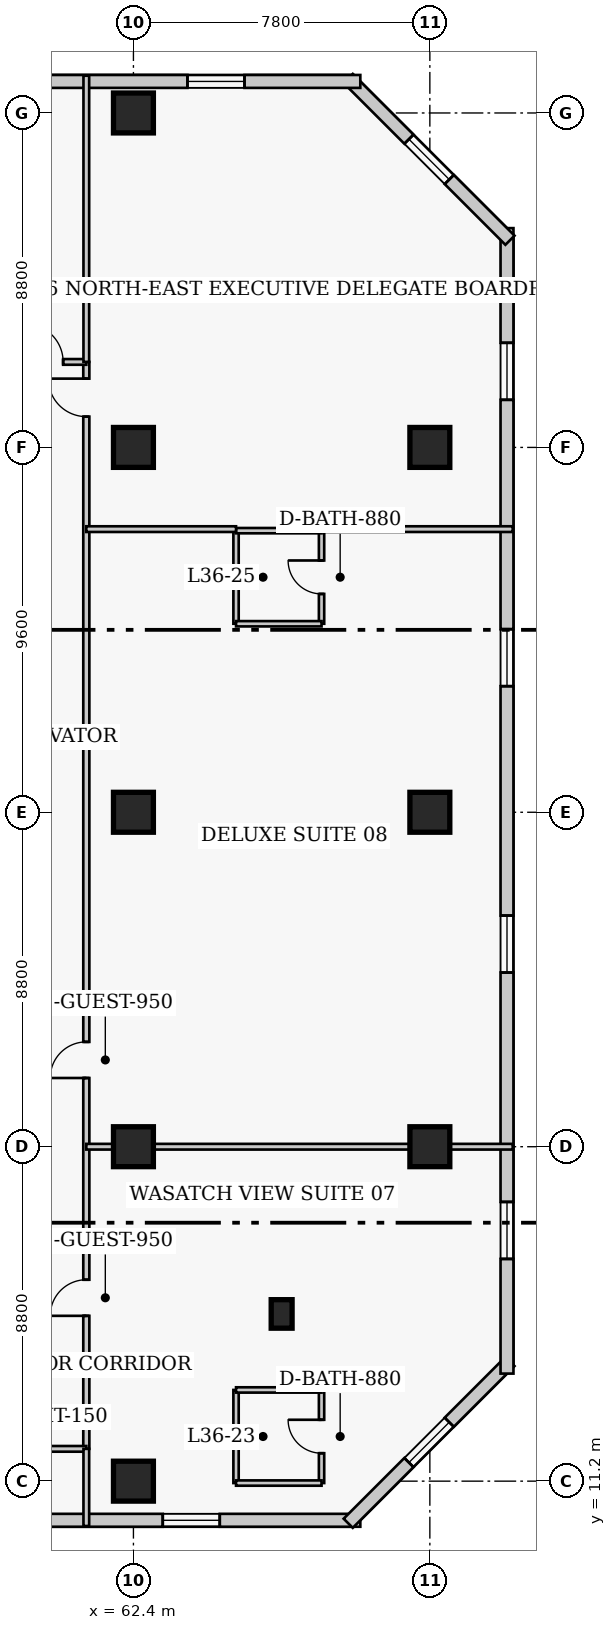
"""IFC4 building model, lengths in metres.
Left out: names, types, materials, properties, quantities, classifications, styles, units other than length and angle.
Written with IfcOpenShell. Run it as: python <this file> out.ifc"""

import sys

from ifc_helpers import new_model, si_unit, direction, frame, frame_2d, origin, origin_2d, place, context, subcontext, project, spatial, rectangle, extrude, element, fill, save


model = new_model("IFC4")
c1 = context("Model", 3, precision=1e-05, world=origin(), true_north=direction((0.0, 1.0)))
c2 = subcontext(c1, "Body", "Model", "MODEL_VIEW")
j1 = project(units=[si_unit("LENGTHUNIT", "METRE"), si_unit("PLANEANGLEUNIT", "RADIAN")], contexts=[c1])
p1 = place(None, origin())
s1 = spatial("IfcSite", under=j1, at=p1, CompositionType="ELEMENT")
p2 = place(p1, origin())
s2 = spatial("IfcBuilding", under=s1, at=p2, CompositionType="ELEMENT")
p3 = place(p2, frame((0.0, 0.0, 146.0)))
s3 = spatial("IfcBuildingStorey", under=s2, at=p3, CompositionType="ELEMENT", Elevation=146.0)
for number, where, z_axis, x_axis in (
    (1, (62.4, 11.2, 0.0), (0.0, 0.0, 1.0), (1.0, 0.0, 0.0)),
    (2, (62.4, 20.0, 0.0), (0.0, 0.0, 1.0), (1.0, 0.0, 0.0)),
    (3, (62.4, 28.8, 0.0), (0.0, 0.0, 1.0), (1.0, 0.0, 0.0)),
    (4, (62.4, 38.4, 0.0), (0.0, 0.0, 1.0), (1.0, 0.0, 0.0)),
    (5, (62.4, 47.2, 0.0), (0.0, 0.0, 1.0), (1.0, 0.0, 0.0)),
    (6, (70.2, 20.0, 0.0), (0.0, 0.0, 1.0), (1.0, 0.0, 0.0)),
    (7, (70.2, 28.8, 0.0), (0.0, 0.0, 1.0), (1.0, 0.0, 0.0)),
    (8, (70.2, 38.4, 0.0), (0.0, 0.0, 1.0), (1.0, 0.0, 0.0)),
):
    element("IfcColumn", number, at=place(p3, frame(where, z_axis=z_axis, x_axis=x_axis)), inside=s3, PredefinedType="COLUMN", context=c2, shape_type="SweptSolid", body=[
        extrude(rectangle(XDim=1.05, YDim=1.05, at=origin_2d()), origin(), (0.0, 0.0, 1.0), 3.8),
    ])
p4 = place(p3, frame((66.3, 15.6, 0.0), z_axis=(0.0, 0.0, 1.0), x_axis=(1.0, 0.0, 0.0)))
e9 = element("IfcColumn", 9, at=p4, inside=s3, PredefinedType="PILASTER", context=c2, shape_type="SweptSolid", body=[
    extrude(rectangle(XDim=0.55, YDim=0.75, at=origin_2d()), origin(), (0.0, 0.0, 1.0), 3.8),
])
p5 = place(p3, frame((41.68, 10.17, 0.0), z_axis=(0.0, 0.0, 1.0), x_axis=(1.0, 0.0, 0.0)))
e10 = element("IfcWall", 10, at=p5, inside=s3, PredefinedType="SOLIDWALL", context=c2, shape_type="SweptSolid", body=[
    extrude(rectangle(XDim=26.69, YDim=0.34, at=frame_2d((13.345, 0.0))), origin(), (0.0, 0.0, 1.0), 3.55),
])
p6 = place(p5, frame((2.548, 0.0, 0.85)))
e11 = element("IfcOpeningElement", 11, at=p6, cuts=e10, PredefinedType="OPENING", context=c2, shape_type="SweptSolid", body=[
    extrude(rectangle(XDim=1.5, YDim=1.75, at=frame_2d((0.75, 0.875))), frame((0.0, 0.18, 0.0), z_axis=(0.0, -1.0, 0.0), x_axis=(1.0, 0.0, 0.0)), (0.0, 0.0, 1.0), 0.36),
])
p7 = place(p5, frame((13.745, 0.0, 0.85)))
e12 = element("IfcOpeningElement", 12, at=p7, cuts=e10, PredefinedType="OPENING", context=c2, shape_type="SweptSolid", body=[
    extrude(rectangle(XDim=1.5, YDim=1.75, at=frame_2d((0.75, 0.875))), frame((0.0, 0.18, 0.0), z_axis=(0.0, -1.0, 0.0), x_axis=(1.0, 0.0, 0.0)), (0.0, 0.0, 1.0), 0.36),
])
p8 = place(p5, frame((21.492, 0.0, 0.85)))
e13 = element("IfcOpeningElement", 13, at=p8, cuts=e10, PredefinedType="OPENING", context=c2, shape_type="SweptSolid", body=[
    extrude(rectangle(XDim=1.5, YDim=1.75, at=frame_2d((0.75, 0.875))), frame((0.0, 0.18, 0.0), z_axis=(0.0, -1.0, 0.0), x_axis=(1.0, 0.0, 0.0)), (0.0, 0.0, 1.0), 0.36),
])
p9 = place(p3, frame((68.052, 10.092, 0.0), z_axis=(0.0, 0.0, 1.0), x_axis=(0.707106781187, 0.707106781187, 0.0)))
e14 = element("IfcWall", 14, at=p9, inside=s3, PredefinedType="SOLIDWALL", context=c2, shape_type="SweptSolid", body=[
    extrude(rectangle(XDim=6.02, YDim=0.34, at=frame_2d((3.01, 0.0))), origin(), (0.0, 0.0, 1.0), 3.55),
])
p10 = place(p9, frame((2.26, 0.0, 0.85)))
e15 = element("IfcOpeningElement", 15, at=p10, cuts=e14, PredefinedType="OPENING", context=c2, shape_type="SweptSolid", body=[
    extrude(rectangle(XDim=1.5, YDim=1.75, at=frame_2d((0.75, 0.875))), frame((0.0, 0.18, 0.0), z_axis=(0.0, -1.0, 0.0), x_axis=(1.0, 0.0, 0.0)), (0.0, 0.0, 1.0), 0.36),
])
p11 = place(p3, frame((72.23, 14.03, 0.0), z_axis=(0.0, 0.0, 1.0), x_axis=(0.0, 1.0, 0.0)))
e16 = element("IfcWall", 16, at=p11, inside=s3, PredefinedType="SOLIDWALL", context=c2, shape_type="SweptSolid", body=[
    extrude(rectangle(XDim=30.14, YDim=0.34, at=frame_2d((15.07, 0.0))), origin(), (0.0, 0.0, 1.0), 3.55),
])
p12 = place(p11, frame((3.018, 0.0, 0.85)))
e17 = element("IfcOpeningElement", 17, at=p12, cuts=e16, PredefinedType="OPENING", context=c2, shape_type="SweptSolid", body=[
    extrude(rectangle(XDim=1.5, YDim=1.75, at=frame_2d((0.75, 0.875))), frame((0.0, 0.18, 0.0), z_axis=(0.0, -1.0, 0.0), x_axis=(1.0, 0.0, 0.0)), (0.0, 0.0, 1.0), 0.36),
])
p13 = place(p11, frame((10.552, 0.0, 0.85)))
e18 = element("IfcOpeningElement", 18, at=p13, cuts=e16, PredefinedType="OPENING", context=c2, shape_type="SweptSolid", body=[
    extrude(rectangle(XDim=1.5, YDim=1.75, at=frame_2d((0.75, 0.875))), frame((0.0, 0.18, 0.0), z_axis=(0.0, -1.0, 0.0), x_axis=(1.0, 0.0, 0.0)), (0.0, 0.0, 1.0), 0.36),
])
p14 = place(p11, frame((18.087, 0.0, 0.85)))
e19 = element("IfcOpeningElement", 19, at=p14, cuts=e16, PredefinedType="OPENING", context=c2, shape_type="SweptSolid", body=[
    extrude(rectangle(XDim=1.5, YDim=1.75, at=frame_2d((0.75, 0.875))), frame((0.0, 0.18, 0.0), z_axis=(0.0, -1.0, 0.0), x_axis=(1.0, 0.0, 0.0)), (0.0, 0.0, 1.0), 0.36),
])
p15 = place(p11, frame((25.623, 0.0, 0.85)))
e20 = element("IfcOpeningElement", 20, at=p15, cuts=e16, PredefinedType="OPENING", context=c2, shape_type="SweptSolid", body=[
    extrude(rectangle(XDim=1.5, YDim=1.75, at=frame_2d((0.75, 0.875))), frame((0.0, 0.18, 0.0), z_axis=(0.0, -1.0, 0.0), x_axis=(1.0, 0.0, 0.0)), (0.0, 0.0, 1.0), 0.36),
])
p16 = place(p3, frame((72.308, 43.852, 0.0), z_axis=(0.0, 0.0, 1.0), x_axis=(-0.707106781187, 0.707106781187, 0.0)))
e21 = element("IfcWall", 21, at=p16, inside=s3, PredefinedType="SOLIDWALL", context=c2, shape_type="SweptSolid", body=[
    extrude(rectangle(XDim=6.02, YDim=0.34, at=frame_2d((3.01, 0.0))), origin(), (0.0, 0.0, 1.0), 3.55),
])
p17 = place(p16, frame((2.26, 0.0, 0.85)))
e22 = element("IfcOpeningElement", 22, at=p17, cuts=e21, PredefinedType="OPENING", context=c2, shape_type="SweptSolid", body=[
    extrude(rectangle(XDim=1.5, YDim=1.75, at=frame_2d((0.75, 0.875))), frame((0.0, 0.18, 0.0), z_axis=(0.0, -1.0, 0.0), x_axis=(1.0, 0.0, 0.0)), (0.0, 0.0, 1.0), 0.36),
])
p18 = place(p3, frame((68.37, 48.03, 0.0), z_axis=(0.0, 0.0, 1.0), x_axis=(-1.0, 0.0, 0.0)))
e23 = element("IfcWall", 23, at=p18, inside=s3, PredefinedType="SOLIDWALL", context=c2, shape_type="SweptSolid", body=[
    extrude(rectangle(XDim=26.69, YDim=0.34, at=frame_2d((13.345, 0.0))), origin(), (0.0, 0.0, 1.0), 3.55),
])
p19 = place(p18, frame((3.048, 0.0, 0.85)))
e24 = element("IfcOpeningElement", 24, at=p19, cuts=e23, PredefinedType="OPENING", context=c2, shape_type="SweptSolid", body=[
    extrude(rectangle(XDim=1.5, YDim=1.75, at=frame_2d((0.75, 0.875))), frame((0.0, 0.18, 0.0), z_axis=(0.0, -1.0, 0.0), x_axis=(1.0, 0.0, 0.0)), (0.0, 0.0, 1.0), 0.36),
])
p20 = place(p18, frame((11.445, 0.0, 0.85)))
e25 = element("IfcOpeningElement", 25, at=p20, cuts=e23, PredefinedType="OPENING", context=c2, shape_type="SweptSolid", body=[
    extrude(rectangle(XDim=1.5, YDim=1.75, at=frame_2d((0.75, 0.875))), frame((0.0, 0.18, 0.0), z_axis=(0.0, -1.0, 0.0), x_axis=(1.0, 0.0, 0.0)), (0.0, 0.0, 1.0), 0.36),
])
p21 = place(p18, frame((22.642, 0.0, 0.85)))
e26 = element("IfcOpeningElement", 26, at=p21, cuts=e23, PredefinedType="OPENING", context=c2, shape_type="SweptSolid", body=[
    extrude(rectangle(XDim=1.5, YDim=1.75, at=frame_2d((0.75, 0.875))), frame((0.0, 0.18, 0.0), z_axis=(0.0, -1.0, 0.0), x_axis=(1.0, 0.0, 0.0)), (0.0, 0.0, 1.0), 0.36),
])
p22 = place(p3, frame((61.16, 12.05, 0.0), z_axis=(0.0, 0.0, 1.0), x_axis=(0.0, 1.0, 0.0)))
e27 = element("IfcWall", 27, at=p22, inside=s3, PredefinedType="PARTITIONING", context=c2, shape_type="SweptSolid", body=[
    extrude(rectangle(XDim=28.6, YDim=0.16, at=frame_2d((14.3, 0.0))), origin(), (0.0, 0.0, 1.0), 3.55),
])
p23 = place(p22, frame((3.5, 0.0, 0.0)))
e28 = element("IfcOpeningElement", 28, at=p23, cuts=e27, PredefinedType="OPENING", context=c2, shape_type="SweptSolid", body=[
    extrude(rectangle(XDim=0.95, YDim=2.1, at=frame_2d((0.475, 1.05))), frame((0.0, 0.09, 0.0), z_axis=(0.0, -1.0, 0.0), x_axis=(1.0, 0.0, 0.0)), (0.0, 0.0, 1.0), 0.18),
])
p24 = place(p22, frame((9.758, 0.0, 0.0)))
e29 = element("IfcOpeningElement", 29, at=p24, cuts=e27, PredefinedType="OPENING", context=c2, shape_type="SweptSolid", body=[
    extrude(rectangle(XDim=0.95, YDim=2.1, at=frame_2d((0.475, 1.05))), frame((0.0, 0.09, 0.0), z_axis=(0.0, -1.0, 0.0), x_axis=(1.0, 0.0, 0.0)), (0.0, 0.0, 1.0), 0.18),
])
p25 = place(p22, frame((27.16, 0.0, 0.0)))
e30 = element("IfcOpeningElement", 30, at=p25, cuts=e27, PredefinedType="OPENING", context=c2, shape_type="SweptSolid", body=[
    extrude(rectangle(XDim=1.0, YDim=2.15, at=frame_2d((0.5, 1.075))), frame((0.0, 0.09, 0.0), z_axis=(0.0, -1.0, 0.0), x_axis=(1.0, 0.0, 0.0)), (0.0, 0.0, 1.0), 0.18),
])
p26 = place(p3, frame((58.94, 12.05, 0.0), z_axis=(0.0, 0.0, 1.0), x_axis=(1.0, 0.0, 0.0)))
e31 = element("IfcWall", 31, at=p26, inside=s3, PredefinedType="PARTITIONING", context=c2, shape_type="SweptSolid", body=[
    extrude(rectangle(XDim=2.22, YDim=0.15, at=frame_2d((1.11, 0.0))), origin(), (0.0, 0.0, 1.0), 3.55),
])
p27 = place(p3, frame((56.8, 40.65, 0.0), z_axis=(0.0, 0.0, 1.0), x_axis=(1.0, 0.0, 0.0)))
e32 = element("IfcWall", 32, at=p27, inside=s3, PredefinedType="PARTITIONING", context=c2, shape_type="SweptSolid", body=[
    extrude(rectangle(XDim=4.36, YDim=0.15, at=frame_2d((2.18, 0.0))), origin(), (0.0, 0.0, 1.0), 3.55),
])
p28 = place(p27, frame((2.75, 0.0, 0.0)))
e33 = element("IfcOpeningElement", 33, at=p28, cuts=e32, PredefinedType="OPENING", context=c2, shape_type="SweptSolid", body=[
    extrude(rectangle(XDim=1.0, YDim=2.15, at=frame_2d((0.5, 1.075))), frame((0.0, 0.085, 0.0), z_axis=(0.0, -1.0, 0.0), x_axis=(1.0, 0.0, 0.0)), (0.0, 0.0, 1.0), 0.17),
])
p29 = place(p3, frame((61.16, 40.65, 0.0), z_axis=(0.0, 0.0, 1.0), x_axis=(0.0, 1.0, 0.0)))
e34 = element("IfcWall", 34, at=p29, inside=s3, PredefinedType="PARTITIONING", context=c2, shape_type="SweptSolid", body=[
    extrude(rectangle(XDim=7.53, YDim=0.15, at=frame_2d((3.765, 0.0))), origin(), (0.0, 0.0, 1.0), 3.55),
])
p30 = place(p3, frame((61.16, 10.02, 0.0), z_axis=(0.0, 0.0, 1.0), x_axis=(0.0, 1.0, 0.0)))
e35 = element("IfcWall", 35, at=p30, inside=s3, PredefinedType="PARTITIONING", context=c2, shape_type="SweptSolid", body=[
    extrude(rectangle(XDim=2.03, YDim=0.15, at=frame_2d((1.015, 0.0))), origin(), (0.0, 0.0, 1.0), 3.55),
])
p31 = place(p3, frame((65.1, 11.15, 0.0), z_axis=(0.0, 0.0, 1.0), x_axis=(0.0, 1.0, 0.0)))
e36 = element("IfcWall", 36, at=p31, inside=s3, PredefinedType="PLUMBINGWALL", context=c2, shape_type="SweptSolid", body=[
    extrude(rectangle(XDim=2.45, YDim=0.14, at=frame_2d((1.225, 0.0))), origin(), (0.0, 0.0, 1.0), 3.55),
])
p32 = place(p3, frame((67.35, 11.15, 0.0), z_axis=(0.0, 0.0, 1.0), x_axis=(0.0, 1.0, 0.0)))
e37 = element("IfcWall", 37, at=p32, inside=s3, PredefinedType="PLUMBINGWALL", context=c2, shape_type="SweptSolid", body=[
    extrude(rectangle(XDim=2.45, YDim=0.14, at=frame_2d((1.225, 0.0))), origin(), (0.0, 0.0, 1.0), 3.55),
])
p33 = place(p32, frame((0.785, 0.0, 0.0)))
e38 = element("IfcOpeningElement", 38, at=p33, cuts=e37, PredefinedType="OPENING", context=c2, shape_type="SweptSolid", body=[
    extrude(rectangle(XDim=0.88, YDim=2.05, at=frame_2d((0.44, 1.025))), frame((0.0, 0.08, 0.0), z_axis=(0.0, -1.0, 0.0), x_axis=(1.0, 0.0, 0.0)), (0.0, 0.0, 1.0), 0.16),
])
for number, where, z_axis, x_axis in (
    (39, (65.1, 11.15, 0.0), (0.0, 0.0, 1.0), (1.0, 0.0, 0.0)),
    (40, (65.1, 13.6, 0.0), (0.0, 0.0, 1.0), (1.0, 0.0, 0.0)),
):
    element("IfcWall", number, at=place(p3, frame(where, z_axis=z_axis, x_axis=x_axis)), inside=s3, PredefinedType="PLUMBINGWALL", context=c2, shape_type="SweptSolid", body=[
        extrude(rectangle(XDim=2.25, YDim=0.14, at=frame_2d((1.125, 0.0))), origin(), (0.0, 0.0, 1.0), 3.55),
    ])
p34 = place(p3, frame((61.16, 20.0, 0.0), z_axis=(0.0, 0.0, 1.0), x_axis=(1.0, 0.0, 0.0)))
e41 = element("IfcWall", 41, at=p34, inside=s3, PredefinedType="PARTITIONING", context=c2, shape_type="SweptSolid", body=[
    extrude(rectangle(XDim=11.22, YDim=0.15, at=frame_2d((5.61, 0.0))), origin(), (0.0, 0.0, 1.0), 2.778),
])
p35 = place(p3, frame((65.1, 33.76, 0.0), z_axis=(0.0, 0.0, 1.0), x_axis=(0.0, 1.0, 0.0)))
e42 = element("IfcWall", 42, at=p35, inside=s3, PredefinedType="PLUMBINGWALL", context=c2, shape_type="SweptSolid", body=[
    extrude(rectangle(XDim=2.45, YDim=0.14, at=frame_2d((1.225, 0.0))), origin(), (0.0, 0.0, 1.0), 3.55),
])
p36 = place(p3, frame((67.35, 33.76, 0.0), z_axis=(0.0, 0.0, 1.0), x_axis=(0.0, 1.0, 0.0)))
e43 = element("IfcWall", 43, at=p36, inside=s3, PredefinedType="PLUMBINGWALL", context=c2, shape_type="SweptSolid", body=[
    extrude(rectangle(XDim=2.45, YDim=0.14, at=frame_2d((1.225, 0.0))), origin(), (0.0, 0.0, 1.0), 3.55),
])
p37 = place(p36, frame((0.785, 0.0, 0.0)))
e44 = element("IfcOpeningElement", 44, at=p37, cuts=e43, PredefinedType="OPENING", context=c2, shape_type="SweptSolid", body=[
    extrude(rectangle(XDim=0.88, YDim=2.05, at=frame_2d((0.44, 1.025))), frame((0.0, 0.08, 0.0), z_axis=(0.0, -1.0, 0.0), x_axis=(1.0, 0.0, 0.0)), (0.0, 0.0, 1.0), 0.16),
])
for number, where, z_axis, x_axis in (
    (45, (65.1, 33.76, 0.0), (0.0, 0.0, 1.0), (1.0, 0.0, 0.0)),
    (46, (65.1, 36.21, 0.0), (0.0, 0.0, 1.0), (1.0, 0.0, 0.0)),
):
    element("IfcWall", number, at=place(p3, frame(where, z_axis=z_axis, x_axis=x_axis)), inside=s3, PredefinedType="PLUMBINGWALL", context=c2, shape_type="SweptSolid", body=[
        extrude(rectangle(XDim=2.25, YDim=0.14, at=frame_2d((1.125, 0.0))), origin(), (0.0, 0.0, 1.0), 3.55),
    ])
p38 = place(p3, frame((61.16, 36.25, 0.0), z_axis=(0.0, 0.0, 1.0), x_axis=(1.0, 0.0, 0.0)))
e47 = element("IfcWall", 47, at=p38, inside=s3, PredefinedType="PARTITIONING", context=c2, shape_type="SweptSolid", body=[
    extrude(rectangle(XDim=3.94, YDim=0.15, at=frame_2d((1.97, 0.0))), origin(), (0.0, 0.0, 1.0), 3.55),
])
p39 = place(p3, frame((67.35, 36.25, 0.0), z_axis=(0.0, 0.0, 1.0), x_axis=(1.0, 0.0, 0.0)))
e48 = element("IfcWall", 48, at=p39, inside=s3, PredefinedType="PARTITIONING", context=c2, shape_type="SweptSolid", body=[
    extrude(rectangle(XDim=5.03, YDim=0.15, at=frame_2d((2.515, 0.0))), origin(), (0.0, 0.0, 1.0), 3.55),
])
p40 = place(p8, origin())
e49 = element("IfcWindow", 49, at=p40, inside=s3, PartitioningType="SINGLE_PANEL", PredefinedType="WINDOW", context=c2, shape_type="SweptSolid", body=[
    extrude(rectangle(XDim=1.5, YDim=1.75, at=frame_2d((0.75, 0.875))), frame((0.0, 0.03, 0.0), z_axis=(0.0, -1.0, 0.0), x_axis=(1.0, 0.0, 0.0)), (0.0, 0.0, 1.0), 0.06),
])
fill(e13, e49)
p41 = place(p10, origin())
e50 = element("IfcWindow", 50, at=p41, inside=s3, PartitioningType="SINGLE_PANEL", PredefinedType="WINDOW", context=c2, shape_type="SweptSolid", body=[
    extrude(rectangle(XDim=1.5, YDim=1.75, at=frame_2d((0.75, 0.875))), frame((0.0, 0.03, 0.0), z_axis=(0.0, -1.0, 0.0), x_axis=(1.0, 0.0, 0.0)), (0.0, 0.0, 1.0), 0.06),
])
fill(e15, e50)
p42 = place(p12, origin())
e51 = element("IfcWindow", 51, at=p42, inside=s3, PartitioningType="SINGLE_PANEL", PredefinedType="WINDOW", context=c2, shape_type="SweptSolid", body=[
    extrude(rectangle(XDim=1.5, YDim=1.75, at=frame_2d((0.75, 0.875))), frame((0.0, 0.03, 0.0), z_axis=(0.0, -1.0, 0.0), x_axis=(1.0, 0.0, 0.0)), (0.0, 0.0, 1.0), 0.06),
])
fill(e17, e51)
p43 = place(p13, origin())
e52 = element("IfcWindow", 52, at=p43, inside=s3, PartitioningType="SINGLE_PANEL", PredefinedType="WINDOW", context=c2, shape_type="SweptSolid", body=[
    extrude(rectangle(XDim=1.5, YDim=1.75, at=frame_2d((0.75, 0.875))), frame((0.0, 0.03, 0.0), z_axis=(0.0, -1.0, 0.0), x_axis=(1.0, 0.0, 0.0)), (0.0, 0.0, 1.0), 0.06),
])
fill(e18, e52)
p44 = place(p14, origin())
e53 = element("IfcWindow", 53, at=p44, inside=s3, PartitioningType="SINGLE_PANEL", PredefinedType="WINDOW", context=c2, shape_type="SweptSolid", body=[
    extrude(rectangle(XDim=1.5, YDim=1.75, at=frame_2d((0.75, 0.875))), frame((0.0, 0.03, 0.0), z_axis=(0.0, -1.0, 0.0), x_axis=(1.0, 0.0, 0.0)), (0.0, 0.0, 1.0), 0.06),
])
fill(e19, e53)
p45 = place(p15, origin())
e54 = element("IfcWindow", 54, at=p45, inside=s3, PartitioningType="SINGLE_PANEL", PredefinedType="WINDOW", context=c2, shape_type="SweptSolid", body=[
    extrude(rectangle(XDim=1.5, YDim=1.75, at=frame_2d((0.75, 0.875))), frame((0.0, 0.03, 0.0), z_axis=(0.0, -1.0, 0.0), x_axis=(1.0, 0.0, 0.0)), (0.0, 0.0, 1.0), 0.06),
])
fill(e20, e54)
p46 = place(p17, origin())
e55 = element("IfcWindow", 55, at=p46, inside=s3, PartitioningType="SINGLE_PANEL", PredefinedType="WINDOW", context=c2, shape_type="SweptSolid", body=[
    extrude(rectangle(XDim=1.5, YDim=1.75, at=frame_2d((0.75, 0.875))), frame((0.0, 0.03, 0.0), z_axis=(0.0, -1.0, 0.0), x_axis=(1.0, 0.0, 0.0)), (0.0, 0.0, 1.0), 0.06),
])
fill(e22, e55)
p47 = place(p19, origin())
e56 = element("IfcWindow", 56, at=p47, inside=s3, PartitioningType="SINGLE_PANEL", PredefinedType="WINDOW", context=c2, shape_type="SweptSolid", body=[
    extrude(rectangle(XDim=1.5, YDim=1.75, at=frame_2d((0.75, 0.875))), frame((0.0, 0.03, 0.0), z_axis=(0.0, -1.0, 0.0), x_axis=(1.0, 0.0, 0.0)), (0.0, 0.0, 1.0), 0.06),
])
fill(e24, e56)
p48 = place(p28, origin())
e57 = element("IfcDoor", 57, at=p48, inside=s3, OperationType="SINGLE_SWING_LEFT", PredefinedType="DOOR", context=c2, shape_type="SweptSolid", body=[
    extrude(rectangle(XDim=1.0, YDim=2.15, at=frame_2d((0.5, 1.075))), frame((0.0, 0.025, 0.0), z_axis=(0.0, -1.0, 0.0), x_axis=(1.0, 0.0, 0.0)), (0.0, 0.0, 1.0), 0.05),
])
fill(e33, e57)
p49 = place(p33, origin())
e58 = element("IfcDoor", 58, at=p49, inside=s3, OperationType="SINGLE_SWING_RIGHT", PredefinedType="DOOR", context=c2, shape_type="SweptSolid", body=[
    extrude(rectangle(XDim=0.88, YDim=2.05, at=frame_2d((0.44, 1.025))), frame((0.0, 0.025, 0.0), z_axis=(0.0, -1.0, 0.0), x_axis=(1.0, 0.0, 0.0)), (0.0, 0.0, 1.0), 0.05),
])
fill(e38, e58)
p50 = place(p23, origin())
e59 = element("IfcDoor", 59, at=p50, inside=s3, OperationType="SINGLE_SWING_LEFT", PredefinedType="DOOR", context=c2, shape_type="SweptSolid", body=[
    extrude(rectangle(XDim=0.95, YDim=2.1, at=frame_2d((0.475, 1.05))), frame((0.0, 0.025, 0.0), z_axis=(0.0, -1.0, 0.0), x_axis=(1.0, 0.0, 0.0)), (0.0, 0.0, 1.0), 0.05),
])
fill(e28, e59)
p51 = place(p37, origin())
e60 = element("IfcDoor", 60, at=p51, inside=s3, OperationType="SINGLE_SWING_RIGHT", PredefinedType="DOOR", context=c2, shape_type="SweptSolid", body=[
    extrude(rectangle(XDim=0.88, YDim=2.05, at=frame_2d((0.44, 1.025))), frame((0.0, 0.025, 0.0), z_axis=(0.0, -1.0, 0.0), x_axis=(1.0, 0.0, 0.0)), (0.0, 0.0, 1.0), 0.05),
])
fill(e44, e60)
p52 = place(p24, origin())
e61 = element("IfcDoor", 61, at=p52, inside=s3, OperationType="SINGLE_SWING_LEFT", PredefinedType="DOOR", context=c2, shape_type="SweptSolid", body=[
    extrude(rectangle(XDim=0.95, YDim=2.1, at=frame_2d((0.475, 1.05))), frame((0.0, 0.025, 0.0), z_axis=(0.0, -1.0, 0.0), x_axis=(1.0, 0.0, 0.0)), (0.0, 0.0, 1.0), 0.05),
])
fill(e29, e61)
p53 = place(p25, origin())
e62 = element("IfcDoor", 62, at=p53, inside=s3, OperationType="SINGLE_SWING_RIGHT", PredefinedType="DOOR", context=c2, shape_type="SweptSolid", body=[
    extrude(rectangle(XDim=1.0, YDim=2.15, at=frame_2d((0.5, 1.075))), frame((0.0, 0.025, 0.0), z_axis=(0.0, -1.0, 0.0), x_axis=(1.0, 0.0, 0.0)), (0.0, 0.0, 1.0), 0.05),
])
fill(e30, e62)
save(model, sys.argv[1])
